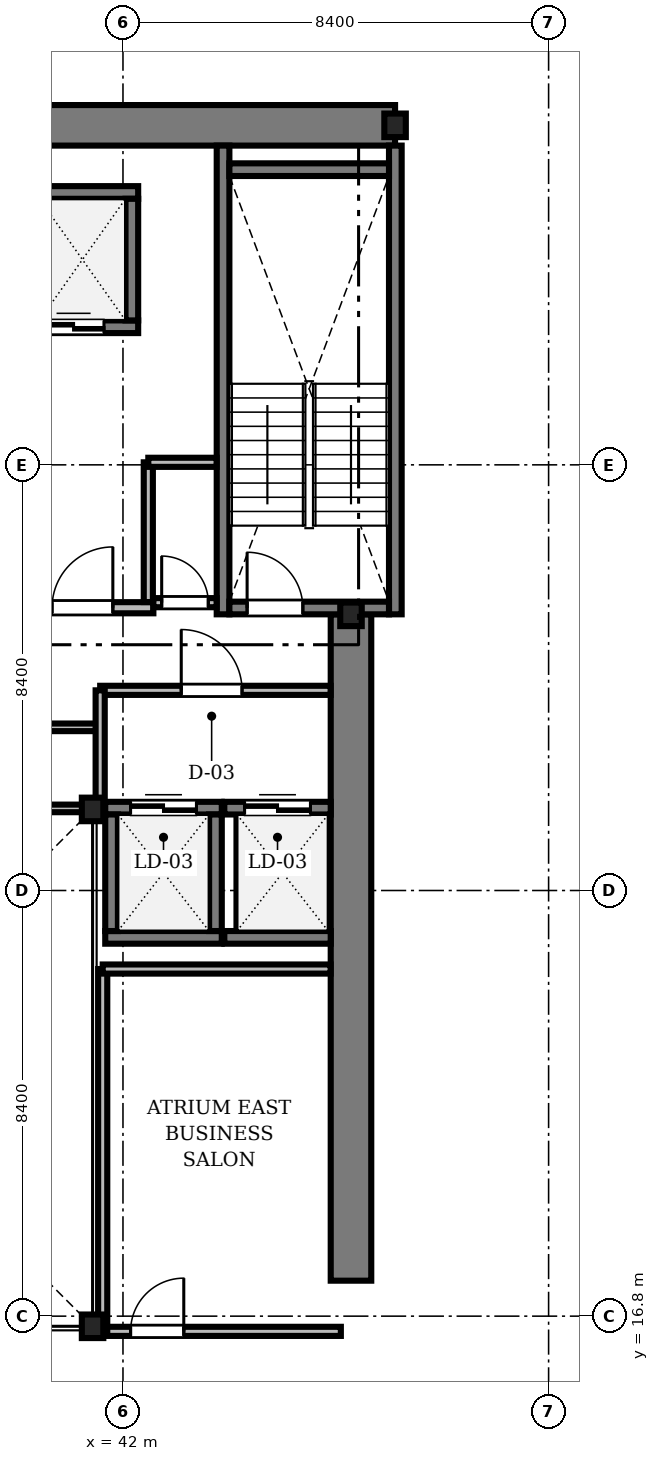
"""IFC4 building model, lengths in metres.
Left out: names, types, materials, properties, quantities, classifications, styles, units other than length and angle.
Written with IfcOpenShell. Run it as: python <this file> out.ifc"""

import sys

from ifc_helpers import new_model, si_unit, direction, frame, frame_2d, origin, origin_2d, place, context, subcontext, project, spatial, rectangle, i_section, extrude, source, transform, mapped, element, fill, save


model = new_model("IFC4")
c1 = context("Model", 3, precision=1e-05, world=origin(), true_north=direction((0.0, 1.0)))
c2 = subcontext(c1, "Body", "Model", "MODEL_VIEW")
j1 = project(units=[si_unit("LENGTHUNIT", "METRE"), si_unit("PLANEANGLEUNIT", "RADIAN")], contexts=[c1])
p1 = place(None, origin())
s1 = spatial("IfcSite", under=j1, at=p1, CompositionType="ELEMENT")
p2 = place(p1, origin())
s2 = spatial("IfcBuilding", under=s1, at=p2, CompositionType="ELEMENT")
p3 = place(p2, frame((0.0, 0.0, 152.0)))
s3 = spatial("IfcBuildingStorey", under=s2, at=p3, CompositionType="ELEMENT", Elevation=152.0)
m1 = source(origin(), c2, "Body", "SweptSolid", [
    extrude(rectangle(XDim=17.52, YDim=0.8, at=frame_2d((8.76, 0.0))), origin(), (0.0, 0.0, 1.0), 3.46),
])
p4 = place(p3, frame((29.85, 40.3, 0.0), z_axis=(0.0, 0.0, 1.0), x_axis=(1.0, 0.0, 0.0)))
e1 = element("IfcWall", 1, at=p4, inside=s3, PredefinedType="SHEAR", context=c2, shape_type="MappedRepresentation", body=[
    mapped(m1, transform((0.0, 0.0, 0.0), scale=1.0)),
])
m2 = source(origin(), c2, "Body", "SweptSolid", [
    extrude(rectangle(XDim=13.15, YDim=0.8, at=frame_2d((6.575, 0.0))), origin(), (0.0, 0.0, 1.0), 3.46),
])
p5 = place(p3, frame((46.5, 17.5, 0.0), z_axis=(0.0, 0.0, 1.0), x_axis=(0.0, 1.0, 0.0)))
e2 = element("IfcWall", 2, at=p5, inside=s3, PredefinedType="SHEAR", context=c2, shape_type="MappedRepresentation", body=[
    mapped(m2, transform((0.0, 0.0, 0.0), scale=1.0)),
])
m3 = source(origin(), c2, "Body", "SweptSolid", [
    extrude(i_section(OverallWidth=0.424, OverallDepth=0.465, WebThickness=0.035, FlangeThickness=0.056, FilletRadius=0.015, at=origin_2d()), origin(), (0.0, 0.0, 1.0), 3.46),
])
for number, where, z_axis, x_axis in (
    (3, (41.4, 16.6, 0.0), (0.0, 0.0, 1.0), (1.0, 0.0, 0.0)),
    (4, (41.4, 26.8, 0.0), (0.0, 0.0, 1.0), (1.0, 0.0, 0.0)),
    (5, (46.5, 30.65, 0.0), (0.0, 0.0, 1.0), (1.0, 0.0, 0.0)),
    (6, (47.37, 40.3, 0.0), (0.0, 0.0, 1.0), (1.0, 0.0, 0.0)),
):
    element("IfcColumn", number, at=place(p3, frame(where, z_axis=z_axis, x_axis=x_axis)), inside=s3, PredefinedType="COLUMN", context=c2, shape_type="MappedRepresentation", body=[
        mapped(m3, transform((0.0, 0.0, 0.0), scale=1.0)),
    ])
m4 = source(origin(), c2, "Body", "SweptSolid", [
    extrude(rectangle(XDim=9.25, YDim=0.25, at=frame_2d((4.625, 0.0))), origin(), (0.0, 0.0, 1.0), 3.5),
])
for number, where, z_axis, x_axis in (
    (7, (43.975, 30.65, 0.0), (0.0, 0.0, 1.0), (0.0, 1.0, 0.0)),
    (8, (47.375, 30.65, 0.0), (0.0, 0.0, 1.0), (0.0, 1.0, 0.0)),
):
    element("IfcWall", number, at=place(p3, frame(where, z_axis=z_axis, x_axis=x_axis)), inside=s3, PredefinedType="SOLIDWALL", context=c2, shape_type="MappedRepresentation", body=[
        mapped(m4, transform((0.0, 0.0, 0.0), scale=1.0)),
    ])
m5 = source(origin(), c2, "Body", "SweptSolid", [
    extrude(rectangle(XDim=3.15, YDim=0.25, at=frame_2d((1.575, 0.0))), origin(), (0.0, 0.0, 1.0), 3.5),
])
p6 = place(p3, frame((44.1, 39.425, 0.0), z_axis=(0.0, 0.0, 1.0), x_axis=(1.0, 0.0, 0.0)))
e9 = element("IfcWall", 9, at=p6, inside=s3, PredefinedType="SOLIDWALL", context=c2, shape_type="MappedRepresentation", body=[
    mapped(m5, transform((0.0, 0.0, 0.0), scale=1.0)),
])
p7 = place(p3, frame((44.1, 30.775, 0.0), z_axis=(0.0, 0.0, 1.0), x_axis=(1.0, 0.0, 0.0)))
e10 = element("IfcWall", 10, at=p7, inside=s3, PredefinedType="SOLIDWALL", context=c2, shape_type="MappedRepresentation", body=[
    mapped(m5, transform((0.0, 0.0, 0.0), scale=1.0)),
])
m6 = source(origin(), c2, "Body", "SweptSolid", [
    extrude(rectangle(XDim=1.1, YDim=2.2, at=frame_2d((0.55, 1.1))), frame((0.0, 0.135, 0.0), z_axis=(0.0, -1.0, 0.0), x_axis=(1.0, 0.0, 0.0)), (0.0, 0.0, 1.0), 0.27),
])
p8 = place(p7, frame((0.35, 0.0, 0.0)))
e11 = element("IfcOpeningElement", 11, at=p8, cuts=e10, PredefinedType="OPENING", context=c2, shape_type="MappedRepresentation", body=[
    mapped(m6, transform((0.0, 0.0, 0.0), scale=1.0)),
])
m7 = source(origin(), c2, "Body", "SweptSolid", [
    extrude(rectangle(XDim=2.8, YDim=0.22, at=frame_2d((1.4, 0.0))), origin(), (0.0, 0.0, 1.0), 3.46),
])
p9 = place(p3, frame((39.8, 30.78, 0.0), z_axis=(0.0, 0.0, 1.0), x_axis=(1.0, 0.0, 0.0)))
e12 = element("IfcWall", 12, at=p9, inside=s3, PredefinedType="SOLIDWALL", context=c2, shape_type="MappedRepresentation", body=[
    mapped(m7, transform((0.0, 0.0, 0.0), scale=1.0)),
])
m8 = source(origin(), c2, "Body", "SweptSolid", [
    extrude(rectangle(XDim=1.2, YDim=2.2, at=frame_2d((0.6, 1.1))), frame((0.0, 0.12, 0.0), z_axis=(0.0, -1.0, 0.0), x_axis=(1.0, 0.0, 0.0)), (0.0, 0.0, 1.0), 0.24),
])
p10 = place(p9, frame((0.8, 0.0, 0.0)))
e13 = element("IfcOpeningElement", 13, at=p10, cuts=e12, PredefinedType="OPENING", context=c2, shape_type="MappedRepresentation", body=[
    mapped(m8, transform((0.0, 0.0, 0.0), scale=1.0)),
])
m9 = source(origin(), c2, "Body", "SweptSolid", [
    extrude(rectangle(XDim=2.55, YDim=0.25, at=frame_2d((1.275, 0.0))), origin(), (0.0, 0.0, 1.0), 3.46),
])
p11 = place(p3, frame((39.75, 36.325, 0.0), z_axis=(0.0, 0.0, 1.0), x_axis=(1.0, 0.0, 0.0)))
e14 = element("IfcWall", 14, at=p11, inside=s3, PredefinedType="SOLIDWALL", context=c2, shape_type="MappedRepresentation", body=[
    mapped(m9, transform((0.0, 0.0, 0.0), scale=1.0)),
])
m10 = source(origin(), c2, "Body", "SweptSolid", [
    extrude(rectangle(XDim=1.2, YDim=2.25, at=frame_2d((0.6, 1.125))), frame((0.0, 0.135, 0.0), z_axis=(0.0, -1.0, 0.0), x_axis=(1.0, 0.0, 0.0)), (0.0, 0.0, 1.0), 0.27),
])
p12 = place(p11, frame((0.675, 0.0, 0.0)))
e15 = element("IfcOpeningElement", 15, at=p12, cuts=e14, PredefinedType="OPENING", context=c2, shape_type="MappedRepresentation", body=[
    mapped(m10, transform((0.0, 0.0, 0.0), scale=1.0)),
])
p13 = place(p3, frame((39.75, 38.975, 0.0), z_axis=(0.0, 0.0, 1.0), x_axis=(1.0, 0.0, 0.0)))
e16 = element("IfcWall", 16, at=p13, inside=s3, PredefinedType="SOLIDWALL", context=c2, shape_type="MappedRepresentation", body=[
    mapped(m9, transform((0.0, 0.0, 0.0), scale=1.0)),
])
m11 = source(origin(), c2, "Body", "SweptSolid", [
    extrude(rectangle(XDim=2.4, YDim=0.25, at=frame_2d((1.2, 0.0))), origin(), (0.0, 0.0, 1.0), 3.46),
])
p14 = place(p3, frame((42.175, 36.45, 0.0), z_axis=(0.0, 0.0, 1.0), x_axis=(0.0, 1.0, 0.0)))
e17 = element("IfcWall", 17, at=p14, inside=s3, PredefinedType="SOLIDWALL", context=c2, shape_type="MappedRepresentation", body=[
    mapped(m11, transform((0.0, 0.0, 0.0), scale=1.0)),
])
m12 = source(origin(), c2, "Body", "SweptSolid", [
    extrude(rectangle(XDim=2.3, YDim=0.25, at=frame_2d((1.15, 0.0))), origin(), (0.0, 0.0, 1.0), 3.46),
])
p15 = place(p3, frame((41.65, 24.275, 0.0), z_axis=(0.0, 0.0, 1.0), x_axis=(1.0, 0.0, 0.0)))
e18 = element("IfcWall", 18, at=p15, inside=s3, PredefinedType="SOLIDWALL", context=c2, shape_type="MappedRepresentation", body=[
    mapped(m12, transform((0.0, 0.0, 0.0), scale=1.0)),
])
p16 = place(p3, frame((41.65, 26.825, 0.0), z_axis=(0.0, 0.0, 1.0), x_axis=(1.0, 0.0, 0.0)))
e19 = element("IfcWall", 19, at=p16, inside=s3, PredefinedType="SOLIDWALL", context=c2, shape_type="MappedRepresentation", body=[
    mapped(m12, transform((0.0, 0.0, 0.0), scale=1.0)),
])
m13 = source(origin(), c2, "Body", "SweptSolid", [
    extrude(rectangle(XDim=1.3, YDim=2.3, at=frame_2d((0.65, 1.15))), frame((0.0, 0.135, 0.0), z_axis=(0.0, -1.0, 0.0), x_axis=(1.0, 0.0, 0.0)), (0.0, 0.0, 1.0), 0.27),
])
p17 = place(p16, frame((0.5, 0.0, 0.0)))
e20 = element("IfcOpeningElement", 20, at=p17, cuts=e19, PredefinedType="OPENING", context=c2, shape_type="MappedRepresentation", body=[
    mapped(m13, transform((0.0, 0.0, 0.0), scale=1.0)),
])
for number, where, z_axis, x_axis in (
    (21, (41.775, 24.4, 0.0), (0.0, 0.0, 1.0), (0.0, 1.0, 0.0)),
    (22, (43.825, 24.4, 0.0), (0.0, 0.0, 1.0), (0.0, 1.0, 0.0)),
):
    element("IfcWall", number, at=place(p3, frame(where, z_axis=z_axis, x_axis=x_axis)), inside=s3, PredefinedType="SOLIDWALL", context=c2, shape_type="MappedRepresentation", body=[
        mapped(m12, transform((0.0, 0.0, 0.0), scale=1.0)),
    ])
m14 = source(origin(), c2, "Body", "SweptSolid", [
    extrude(rectangle(XDim=2.1, YDim=0.25, at=frame_2d((1.05, 0.0))), origin(), (0.0, 0.0, 1.0), 3.46),
])
p18 = place(p3, frame((44.0, 24.275, 0.0), z_axis=(0.0, 0.0, 1.0), x_axis=(1.0, 0.0, 0.0)))
e23 = element("IfcWall", 23, at=p18, inside=s3, PredefinedType="SOLIDWALL", context=c2, shape_type="MappedRepresentation", body=[
    mapped(m14, transform((0.0, 0.0, 0.0), scale=1.0)),
])
p19 = place(p3, frame((44.0, 26.825, 0.0), z_axis=(0.0, 0.0, 1.0), x_axis=(1.0, 0.0, 0.0)))
e24 = element("IfcWall", 24, at=p19, inside=s3, PredefinedType="SOLIDWALL", context=c2, shape_type="MappedRepresentation", body=[
    mapped(m14, transform((0.0, 0.0, 0.0), scale=1.0)),
])
p20 = place(p19, frame((0.4, 0.0, 0.0)))
e25 = element("IfcOpeningElement", 25, at=p20, cuts=e24, PredefinedType="OPENING", context=c2, shape_type="MappedRepresentation", body=[
    mapped(m13, transform((0.0, 0.0, 0.0), scale=1.0)),
])
m15 = source(origin(), c2, "Body", "SweptSolid", [
    extrude(rectangle(XDim=4.548, YDim=0.18, at=frame_2d((2.274, 0.0))), origin(), (0.0, 0.0, 1.0), 3.092),
])
p21 = place(p3, frame((41.55, 29.15, 0.0), z_axis=(0.0, 0.0, 1.0), x_axis=(1.0, 0.0, 0.0)))
e26 = element("IfcWall", 26, at=p21, inside=s3, PredefinedType="PARTITIONING", context=c2, shape_type="MappedRepresentation", body=[
    mapped(m15, transform((0.0, 0.0, 0.0), scale=1.0)),
])
m16 = source(origin(), c2, "Body", "SweptSolid", [
    extrude(rectangle(XDim=1.2, YDim=2.2, at=frame_2d((0.6, 1.1))), frame((0.0, 0.1, 0.0), z_axis=(0.0, -1.0, 0.0), x_axis=(1.0, 0.0, 0.0)), (0.0, 0.0, 1.0), 0.2),
])
p22 = place(p21, frame((1.6, 0.0, 0.0)))
e27 = element("IfcOpeningElement", 27, at=p22, cuts=e26, PredefinedType="OPENING", context=c2, shape_type="MappedRepresentation", body=[
    mapped(m16, transform((0.0, 0.0, 0.0), scale=1.0)),
])
m17 = source(origin(), c2, "Body", "SweptSolid", [
    extrude(rectangle(XDim=4.7, YDim=0.18, at=frame_2d((2.35, 0.0))), origin(), (0.0, 0.0, 1.0), 2.852),
])
p23 = place(p3, frame((41.6, 16.5, 0.0), z_axis=(0.0, 0.0, 1.0), x_axis=(1.0, 0.0, 0.0)))
e28 = element("IfcWall", 28, at=p23, inside=s3, PredefinedType="PARTITIONING", context=c2, shape_type="MappedRepresentation", body=[
    mapped(m17, transform((0.0, 0.0, 0.0), scale=1.0)),
])
m18 = source(origin(), c2, "Body", "SweptSolid", [
    extrude(rectangle(XDim=1.05, YDim=2.2, at=frame_2d((0.525, 1.1))), frame((0.0, 0.1, 0.0), z_axis=(0.0, -1.0, 0.0), x_axis=(1.0, 0.0, 0.0)), (0.0, 0.0, 1.0), 0.2),
])
p24 = place(p23, frame((0.55, 0.0, 0.0)))
e29 = element("IfcOpeningElement", 29, at=p24, cuts=e28, PredefinedType="OPENING", context=c2, shape_type="MappedRepresentation", body=[
    mapped(m18, transform((0.0, 0.0, 0.0), scale=1.0)),
])
m19 = source(origin(), c2, "Body", "SweptSolid", [
    extrude(rectangle(XDim=2.74, YDim=0.15, at=frame_2d((1.37, 0.0))), origin(), (0.0, 0.0, 1.0), 3.46),
])
p25 = place(p3, frame((38.78, 28.42, 0.0), z_axis=(0.0, 0.0, 1.0), x_axis=(1.0, 0.0, 0.0)))
e30 = element("IfcWall", 30, at=p25, inside=s3, PredefinedType="PARTITIONING", context=c2, shape_type="MappedRepresentation", body=[
    mapped(m19, transform((0.0, 0.0, 0.0), scale=1.0)),
])
m20 = source(origin(), c2, "Body", "SweptSolid", [
    extrude(rectangle(XDim=0.92, YDim=2.1, at=frame_2d((0.46, 1.05))), frame((0.0, 0.085, 0.0), z_axis=(0.0, -1.0, 0.0), x_axis=(1.0, 0.0, 0.0)), (0.0, 0.0, 1.0), 0.17),
])
p26 = place(p25, frame((0.63, 0.0, 0.0)))
e31 = element("IfcOpeningElement", 31, at=p26, cuts=e30, PredefinedType="OPENING", context=c2, shape_type="MappedRepresentation", body=[
    mapped(m20, transform((0.0, 0.0, 0.0), scale=1.0)),
])
m21 = source(origin(), c2, "Body", "SweptSolid", [
    extrude(rectangle(XDim=1.248, YDim=0.18, at=frame_2d((0.624, 0.0))), origin(), (0.0, 0.0, 1.0), 3.46),
])
p27 = place(p3, frame((42.6, 30.88, 0.0), z_axis=(0.0, 0.0, 1.0), x_axis=(1.0, 0.0, 0.0)))
e32 = element("IfcWall", 32, at=p27, inside=s3, PredefinedType="PARTITIONING", context=c2, shape_type="MappedRepresentation", body=[
    mapped(m21, transform((0.0, 0.0, 0.0), scale=1.0)),
])
m22 = source(origin(), c2, "Body", "SweptSolid", [
    extrude(rectangle(XDim=0.92, YDim=2.1, at=frame_2d((0.46, 1.05))), frame((0.0, 0.1, 0.0), z_axis=(0.0, -1.0, 0.0), x_axis=(1.0, 0.0, 0.0)), (0.0, 0.0, 1.0), 0.2),
])
p28 = place(p27, frame((0.164, 0.0, 0.0)))
e33 = element("IfcOpeningElement", 33, at=p28, cuts=e32, PredefinedType="OPENING", context=c2, shape_type="MappedRepresentation", body=[
    mapped(m22, transform((0.0, 0.0, 0.0), scale=1.0)),
])
m23 = source(origin(), c2, "Body", "SweptSolid", [
    extrude(rectangle(XDim=7.15, YDim=0.18, at=frame_2d((3.575, 0.0))), origin(), (0.0, 0.0, 1.0), 2.852),
])
p29 = place(p3, frame((41.6, 16.5, 0.0), z_axis=(0.0, 0.0, 1.0), x_axis=(0.0, 1.0, 0.0)))
e34 = element("IfcWall", 34, at=p29, inside=s3, PredefinedType="PARTITIONING", context=c2, shape_type="MappedRepresentation", body=[
    mapped(m23, transform((0.0, 0.0, 0.0), scale=1.0)),
])
m24 = source(origin(), c2, "Body", "SweptSolid", [
    extrude(rectangle(XDim=4.498, YDim=0.18, at=frame_2d((2.249, 0.0))), origin(), (0.0, 0.0, 1.0), 3.46),
])
p30 = place(p3, frame((41.6, 23.65, 0.0), z_axis=(0.0, 0.0, 1.0), x_axis=(1.0, 0.0, 0.0)))
e35 = element("IfcWall", 35, at=p30, inside=s3, PredefinedType="PARTITIONING", context=c2, shape_type="MappedRepresentation", body=[
    mapped(m24, transform((0.0, 0.0, 0.0), scale=1.0)),
])
m25 = source(origin(), c2, "Body", "SweptSolid", [
    extrude(rectangle(XDim=2.758, YDim=0.18, at=frame_2d((1.379, 0.0))), origin(), (0.0, 0.0, 1.0), 3.46),
])
p31 = place(p3, frame((42.5, 30.892, 0.0), z_axis=(0.0, 0.0, 1.0), x_axis=(0.0, 1.0, 0.0)))
e36 = element("IfcWall", 36, at=p31, inside=s3, PredefinedType="PARTITIONING", context=c2, shape_type="MappedRepresentation", body=[
    mapped(m25, transform((0.0, 0.0, 0.0), scale=1.0)),
])
m26 = source(origin(), c2, "Body", "SweptSolid", [
    extrude(rectangle(XDim=2.74, YDim=0.15, at=frame_2d((1.37, 0.0))), origin(), (0.0, 0.0, 1.0), 2.852),
])
p32 = place(p3, frame((38.78, 26.82, 0.0), z_axis=(0.0, 0.0, 1.0), x_axis=(1.0, 0.0, 0.0)))
e37 = element("IfcWall", 37, at=p32, inside=s3, PredefinedType="PARTITIONING", context=c2, shape_type="MappedRepresentation", body=[
    mapped(m26, transform((0.0, 0.0, 0.0), scale=1.0)),
])
m27 = source(origin(), c2, "Body", "SweptSolid", [
    extrude(rectangle(XDim=2.35, YDim=0.18, at=frame_2d((1.175, 0.0))), origin(), (0.0, 0.0, 1.0), 2.852),
])
p33 = place(p3, frame((41.55, 26.8, 0.0), z_axis=(0.0, 0.0, 1.0), x_axis=(0.0, 1.0, 0.0)))
e38 = element("IfcWall", 38, at=p33, inside=s3, PredefinedType="PARTITIONING", context=c2, shape_type="MappedRepresentation", body=[
    mapped(m27, transform((0.0, 0.0, 0.0), scale=1.0)),
])
m28 = source(origin(), c2, "Body", "SweptSolid", [
    extrude(rectangle(XDim=1.348, YDim=0.18, at=frame_2d((0.674, 0.0))), origin(), (0.0, 0.0, 1.0), 3.46),
])
p34 = place(p3, frame((42.5, 33.65, 0.0), z_axis=(0.0, 0.0, 1.0), x_axis=(1.0, 0.0, 0.0)))
e39 = element("IfcWall", 39, at=p34, inside=s3, PredefinedType="PARTITIONING", context=c2, shape_type="MappedRepresentation", body=[
    mapped(m28, transform((0.0, 0.0, 0.0), scale=1.0)),
])
m29 = source(origin(), c2, "Body", "SweptSolid", [
    extrude(rectangle(XDim=1.1, YDim=2.2, at=frame_2d((0.55, 1.1))), frame((0.0, 0.025, 0.0), z_axis=(0.0, -1.0, 0.0), x_axis=(1.0, 0.0, 0.0)), (0.0, 0.0, 1.0), 0.05),
])
p35 = place(p8, origin())
e40 = element("IfcDoor", 40, at=p35, inside=s3, OperationType="SINGLE_SWING_LEFT", PredefinedType="DOOR", context=c2, shape_type="MappedRepresentation", body=[
    mapped(m29, transform((0.0, 0.0, 0.0), scale=1.0)),
])
fill(e11, e40)
m30 = source(origin(), c2, "Body", "SweptSolid", [
    extrude(rectangle(XDim=1.2, YDim=2.2, at=frame_2d((0.6, 1.1))), frame((0.0, 0.025, 0.0), z_axis=(0.0, -1.0, 0.0), x_axis=(1.0, 0.0, 0.0)), (0.0, 0.0, 1.0), 0.05),
])
p36 = place(p10, origin())
e41 = element("IfcDoor", 41, at=p36, inside=s3, OperationType="SINGLE_SWING_RIGHT", PredefinedType="DOOR", context=c2, shape_type="MappedRepresentation", body=[
    mapped(m30, transform((0.0, 0.0, 0.0), scale=1.0)),
])
fill(e13, e41)
m31 = source(origin(), c2, "Body", "SweptSolid", [
    extrude(rectangle(XDim=1.2, YDim=2.25, at=frame_2d((0.6, 1.125))), frame((0.0, 0.025, 0.0), z_axis=(0.0, -1.0, 0.0), x_axis=(1.0, 0.0, 0.0)), (0.0, 0.0, 1.0), 0.05),
])
p37 = place(p12, origin())
e42 = element("IfcDoor", 42, at=p37, inside=s3, OperationType="DOUBLE_DOOR_SLIDING", PredefinedType="DOOR", context=c2, shape_type="MappedRepresentation", body=[
    mapped(m31, transform((0.0, 0.0, 0.0), scale=1.0)),
])
fill(e15, e42)
m32 = source(origin(), c2, "Body", "SweptSolid", [
    extrude(rectangle(XDim=1.3, YDim=2.3, at=frame_2d((0.65, 1.15))), frame((0.0, 0.025, 0.0), z_axis=(0.0, -1.0, 0.0), x_axis=(1.0, 0.0, 0.0)), (0.0, 0.0, 1.0), 0.05),
])
p38 = place(p17, origin())
e43 = element("IfcDoor", 43, at=p38, inside=s3, OperationType="DOUBLE_DOOR_SLIDING", PredefinedType="DOOR", context=c2, shape_type="MappedRepresentation", body=[
    mapped(m32, transform((0.0, 0.0, 0.0), scale=1.0)),
])
fill(e20, e43)
p39 = place(p20, origin())
e44 = element("IfcDoor", 44, at=p39, inside=s3, OperationType="DOUBLE_DOOR_SLIDING", PredefinedType="DOOR", context=c2, shape_type="MappedRepresentation", body=[
    mapped(m32, transform((0.0, 0.0, 0.0), scale=1.0)),
])
fill(e25, e44)
p40 = place(p22, origin())
e45 = element("IfcDoor", 45, at=p40, inside=s3, OperationType="SINGLE_SWING_LEFT", PredefinedType="DOOR", context=c2, shape_type="MappedRepresentation", body=[
    mapped(m30, transform((0.0, 0.0, 0.0), scale=1.0)),
])
fill(e27, e45)
m33 = source(origin(), c2, "Body", "SweptSolid", [
    extrude(rectangle(XDim=1.05, YDim=2.2, at=frame_2d((0.525, 1.1))), frame((0.0, 0.025, 0.0), z_axis=(0.0, -1.0, 0.0), x_axis=(1.0, 0.0, 0.0)), (0.0, 0.0, 1.0), 0.05),
])
p41 = place(p24, origin())
e46 = element("IfcDoor", 46, at=p41, inside=s3, OperationType="SINGLE_SWING_RIGHT", PredefinedType="DOOR", context=c2, shape_type="MappedRepresentation", body=[
    mapped(m33, transform((0.0, 0.0, 0.0), scale=1.0)),
])
fill(e29, e46)
m34 = source(origin(), c2, "Body", "SweptSolid", [
    extrude(rectangle(XDim=0.92, YDim=2.1, at=frame_2d((0.46, 1.05))), frame((0.0, 0.025, 0.0), z_axis=(0.0, -1.0, 0.0), x_axis=(1.0, 0.0, 0.0)), (0.0, 0.0, 1.0), 0.05),
])
p42 = place(p28, origin())
e47 = element("IfcDoor", 47, at=p42, inside=s3, OperationType="SINGLE_SWING_LEFT", PredefinedType="DOOR", context=c2, shape_type="MappedRepresentation", body=[
    mapped(m34, transform((0.0, 0.0, 0.0), scale=1.0)),
])
fill(e33, e47)
save(model, sys.argv[1])
